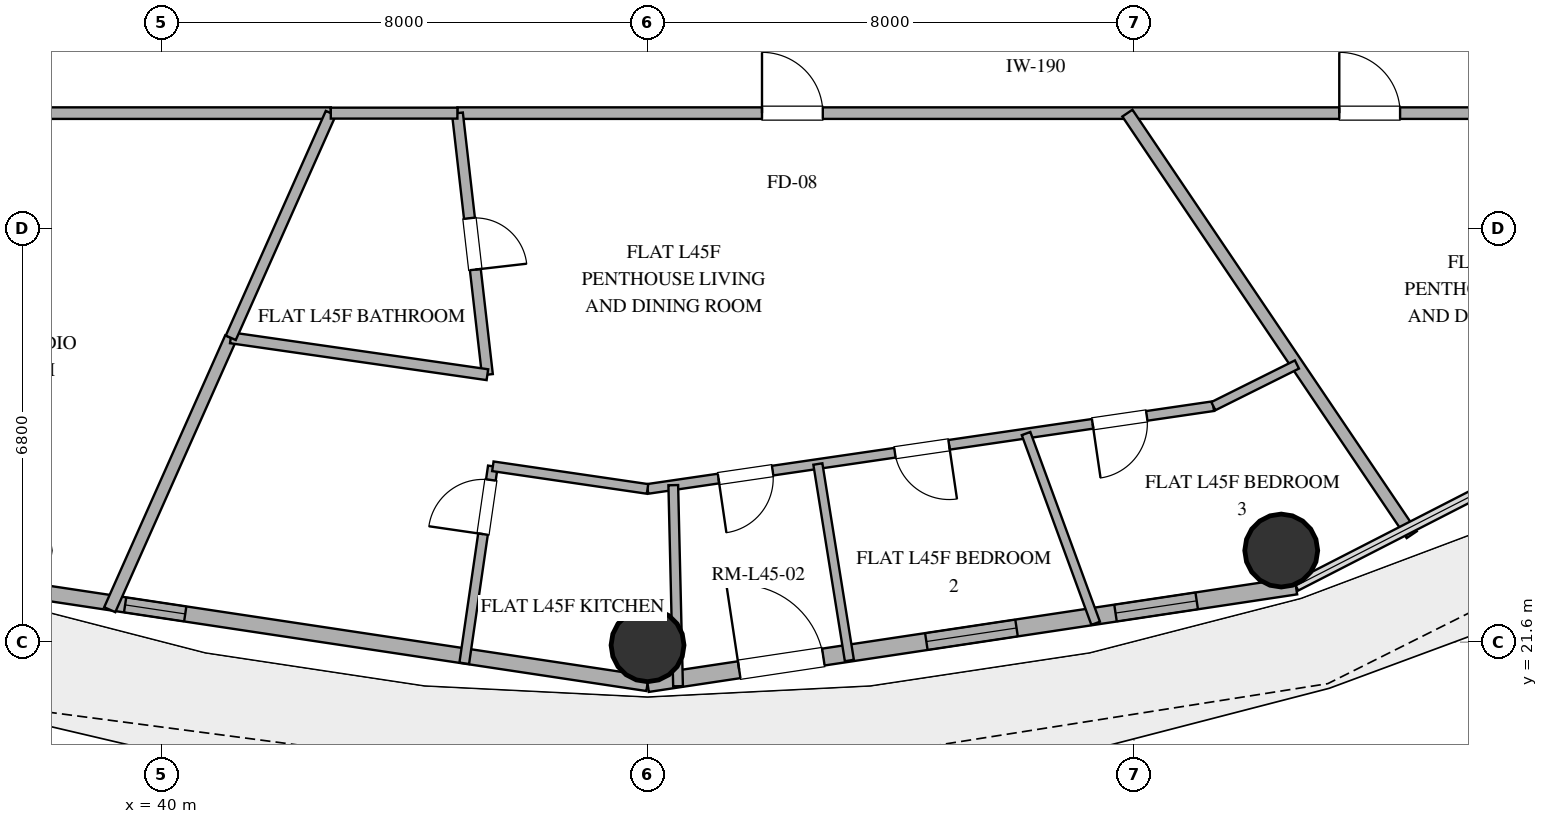
"""IFC4 building model, lengths in metres.
Left out: names, types, materials, properties, quantities, classifications, styles, units other than length and angle.
Written with IfcOpenShell. Run it as: python <this file> out.ifc"""

import sys

from ifc_helpers import new_model, si_unit, direction, frame, frame_2d, origin, origin_2d, place, context, subcontext, project, spatial, rectangle, hollow_circle, extrude, element, fill, save


model = new_model("IFC4")
c1 = context("Model", 3, precision=1e-05, world=origin(), true_north=direction((0.0, 1.0)))
c2 = subcontext(c1, "Body", "Model", "MODEL_VIEW")
j1 = project(units=[si_unit("LENGTHUNIT", "METRE"), si_unit("PLANEANGLEUNIT", "RADIAN")], contexts=[c1])
p1 = place(None, origin())
s1 = spatial("IfcSite", under=j1, at=p1, CompositionType="ELEMENT")
p2 = place(p1, origin())
s2 = spatial("IfcBuilding", under=s1, at=p2, CompositionType="ELEMENT")
p3 = place(p2, frame((0.0, 0.0, 179.4)))
s3 = spatial("IfcBuildingStorey", under=s2, at=p3, CompositionType="ELEMENT", Elevation=179.4)
for number, where, z_axis, x_axis in (
    (1, (48.0, 21.55, 0.0), (0.0, 0.0, 1.0), (1.0, 0.0, 0.0)),
    (2, (58.422, 23.107, 0.0), (0.0, 0.0, 1.0), (1.0, 0.0, 0.0)),
):
    element("IfcColumn", number, at=place(p3, frame(where, z_axis=z_axis, x_axis=x_axis)), inside=s3, PredefinedType="COLUMN", context=c2, shape_type="SweptSolid", body=[
        extrude(hollow_circle(Radius=0.6, WallThickness=0.032, at=origin_2d()), origin(), (0.0, 0.0, 1.0), 3.38),
    ])
p4 = place(p3, frame((37.337, 22.525, 0.0), z_axis=(0.0, 0.0, 1.0), x_axis=(0.988863993413, -0.148822049884, 0.0)))
e3 = element("IfcWall", 3, at=p4, inside=s3, PredefinedType="SOLIDWALL", context=c2, shape_type="SweptSolid", body=[
    extrude(rectangle(XDim=10.783, YDim=0.25, at=frame_2d((5.392, 0.0))), origin(), (0.0, 0.0, 1.0), 3.38),
])
p5 = place(p4, frame((2.094, 0.0, 0.35)))
e4 = element("IfcOpeningElement", 4, at=p5, cuts=e3, PredefinedType="OPENING", context=c2, shape_type="SweptSolid", body=[
    extrude(rectangle(XDim=1.0, YDim=1.05, at=frame_2d((0.5, 0.525))), frame((0.0, 0.135, 0.0), z_axis=(0.0, -1.0, 0.0), x_axis=(1.0, 0.0, 0.0)), (0.0, 0.0, 1.0), 0.27),
])
p6 = place(p3, frame((48.0, 20.92, 0.0), z_axis=(0.0, 0.0, 1.0), x_axis=(0.988863993413, 0.148822049884, 0.0)))
e5 = element("IfcWall", 5, at=p6, inside=s3, PredefinedType="SOLIDWALL", context=c2, shape_type="SweptSolid", body=[
    extrude(rectangle(XDim=10.783, YDim=0.28, at=frame_2d((5.392, 0.0))), origin(), (0.0, 0.0, 1.0), 3.38),
])
p7 = place(p6, frame((1.524, 0.0, 0.0)))
e6 = element("IfcOpeningElement", 6, at=p7, cuts=e5, PredefinedType="OPENING", context=c2, shape_type="SweptSolid", body=[
    extrude(rectangle(XDim=1.4, YDim=2.2, at=frame_2d((0.7, 1.1))), frame((0.0, 0.15, 0.0), z_axis=(0.0, -1.0, 0.0), x_axis=(1.0, 0.0, 0.0)), (0.0, 0.0, 1.0), 0.3),
])
p8 = place(p6, frame((4.637, 0.0, 0.85)))
e7 = element("IfcOpeningElement", 7, at=p8, cuts=e5, PredefinedType="OPENING", context=c2, shape_type="SweptSolid", body=[
    extrude(rectangle(XDim=1.5, YDim=2.0, at=frame_2d((0.75, 1.0))), frame((0.0, 0.15, 0.0), z_axis=(0.0, -1.0, 0.0), x_axis=(1.0, 0.0, 0.0)), (0.0, 0.0, 1.0), 0.3),
])
p9 = place(p6, frame((7.783, 0.0, 0.85)))
e8 = element("IfcOpeningElement", 8, at=p9, cuts=e5, PredefinedType="OPENING", context=c2, shape_type="SweptSolid", body=[
    extrude(rectangle(XDim=1.35, YDim=1.8, at=frame_2d((0.675, 0.9))), frame((0.0, 0.15, 0.0), z_axis=(0.0, -1.0, 0.0), x_axis=(1.0, 0.0, 0.0)), (0.0, 0.0, 1.0), 0.3),
])
p10 = place(p3, frame((44.873, 30.3, 0.0), z_axis=(0.0, 0.0, 1.0), x_axis=(1.0, 0.0, 0.0)))
e9 = element("IfcWall", 9, at=p10, inside=s3, PredefinedType="PARTITIONING", context=c2, shape_type="SweptSolid", body=[
    extrude(rectangle(XDim=19.027, YDim=0.19, at=frame_2d((9.514, 0.0))), origin(), (0.0, 0.0, 1.0), 2.74),
])
p11 = place(p10, frame((5.01, 0.0, 0.0)))
e10 = element("IfcOpeningElement", 10, at=p11, cuts=e9, PredefinedType="OPENING", context=c2, shape_type="SweptSolid", body=[
    extrude(rectangle(XDim=1.0, YDim=2.2, at=frame_2d((0.5, 1.1))), frame((0.0, 0.105, 0.0), z_axis=(0.0, -1.0, 0.0), x_axis=(1.0, 0.0, 0.0)), (0.0, 0.0, 1.0), 0.21),
])
p12 = place(p10, frame((14.504, 0.0, 0.0)))
e11 = element("IfcOpeningElement", 11, at=p12, cuts=e9, PredefinedType="OPENING", context=c2, shape_type="SweptSolid", body=[
    extrude(rectangle(XDim=1.0, YDim=2.2, at=frame_2d((0.5, 1.1))), frame((0.0, 0.105, 0.0), z_axis=(0.0, -1.0, 0.0), x_axis=(1.0, 0.0, 0.0)), (0.0, 0.0, 1.0), 0.21),
])
p13 = place(p3, frame((32.1, 30.3, 0.0), z_axis=(0.0, 0.0, 1.0), x_axis=(1.0, 0.0, 0.0)))
e12 = element("IfcWall", 12, at=p13, inside=s3, PredefinedType="PARTITIONING", context=c2, shape_type="SweptSolid", body=[
    extrude(rectangle(XDim=10.691, YDim=0.19, at=frame_2d((5.345, 0.0))), origin(), (0.0, 0.0, 1.0), 2.74),
])
p14 = place(p13, frame((4.845, 0.0, 0.0)))
e13 = element("IfcOpeningElement", 13, at=p14, cuts=e12, PredefinedType="OPENING", context=c2, shape_type="SweptSolid", body=[
    extrude(rectangle(XDim=1.0, YDim=2.2, at=frame_2d((0.5, 1.1))), frame((0.0, 0.105, 0.0), z_axis=(0.0, -1.0, 0.0), x_axis=(1.0, 0.0, 0.0)), (0.0, 0.0, 1.0), 0.21),
])
p15 = place(p3, frame((55.892, 30.3, 0.0), z_axis=(0.0, 0.0, 1.0), x_axis=(0.55918600376, -0.829042226427, 0.0)))
e14 = element("IfcWall", 14, at=p15, inside=s3, PredefinedType="PARTITIONING", context=c2, shape_type="SweptSolid", body=[
    extrude(rectangle(XDim=8.362, YDim=0.2, at=frame_2d((4.181, 0.0))), origin(), (0.0, 0.0, 1.0), 2.74),
])
p16 = place(p3, frame((39.155, 22.134, 0.0), z_axis=(0.0, 0.0, 1.0), x_axis=(0.406740050792, 0.913543940422, 0.0)))
e15 = element("IfcWall", 15, at=p16, inside=s3, PredefinedType="PARTITIONING", context=c2, shape_type="SweptSolid", body=[
    extrude(rectangle(XDim=4.894, YDim=0.2, at=frame_2d((2.447, 0.0))), origin(), (0.0, 0.0, 1.0), 2.74),
])
p17 = place(p3, frame((44.873, 30.3, 0.0), z_axis=(0.0, 0.0, 1.0), x_axis=(0.11390281129, -0.993491897088, 0.0)))
e16 = element("IfcWall", 16, at=p17, inside=s3, PredefinedType="PLUMBINGWALL", context=c2, shape_type="SweptSolid", body=[
    extrude(rectangle(XDim=4.33, YDim=0.18, at=frame_2d((2.165, 0.0))), origin(), (0.0, 0.0, 1.0), 2.74),
])
p18 = place(p17, frame((1.74, 0.0, 0.0)))
e17 = element("IfcOpeningElement", 17, at=p18, cuts=e16, PredefinedType="OPENING", context=c2, shape_type="SweptSolid", body=[
    extrude(rectangle(XDim=0.85, YDim=2.1, at=frame_2d((0.425, 1.05))), frame((0.0, 0.1, 0.0), z_axis=(0.0, -1.0, 0.0), x_axis=(1.0, 0.0, 0.0)), (0.0, 0.0, 1.0), 0.2),
])
p19 = place(p3, frame((45.366, 25.999, 0.0), z_axis=(0.0, 0.0, 1.0), x_axis=(-0.98982427769, 0.14229511339, 0.0)))
e18 = element("IfcWall", 18, at=p19, inside=s3, PredefinedType="PLUMBINGWALL", context=c2, shape_type="SweptSolid", body=[
    extrude(rectangle(XDim=4.264, YDim=0.18, at=frame_2d((2.132, 0.0))), origin(), (0.0, 0.0, 1.0), 2.74),
])
p20 = place(p3, frame((41.146, 26.605, 0.0), z_axis=(0.0, 0.0, 1.0), x_axis=(0.406732062562, 0.913547497005, 0.0)))
e19 = element("IfcWall", 19, at=p20, inside=s3, PredefinedType="PLUMBINGWALL", context=c2, shape_type="SweptSolid", body=[
    extrude(rectangle(XDim=4.044, YDim=0.18, at=frame_2d((2.022, 0.0))), origin(), (0.0, 0.0, 1.0), 2.74),
])
p21 = place(p3, frame((57.305, 25.481, 0.0), z_axis=(0.0, 0.0, 1.0), x_axis=(-0.989470950226, -0.144731609055, 0.0)))
e20 = element("IfcWall", 20, at=p21, inside=s3, PredefinedType="PLUMBINGWALL", context=c2, shape_type="SweptSolid", body=[
    extrude(rectangle(XDim=9.404, YDim=0.16, at=frame_2d((4.702, 0.0))), origin(), (0.0, 0.0, 1.0), 2.74),
])
p22 = place(p21, frame((4.393, 0.0, 0.0)))
e21 = element("IfcOpeningElement", 21, at=p22, cuts=e20, PredefinedType="OPENING", context=c2, shape_type="SweptSolid", body=[
    extrude(rectangle(XDim=0.9, YDim=2.1, at=frame_2d((0.45, 1.05))), frame((0.0, 0.09, 0.0), z_axis=(0.0, -1.0, 0.0), x_axis=(1.0, 0.0, 0.0)), (0.0, 0.0, 1.0), 0.18),
])
p23 = place(p21, frame((1.106, 0.0, 0.0)))
e22 = element("IfcOpeningElement", 22, at=p23, cuts=e20, PredefinedType="OPENING", context=c2, shape_type="SweptSolid", body=[
    extrude(rectangle(XDim=0.9, YDim=2.1, at=frame_2d((0.45, 1.05))), frame((0.0, 0.09, 0.0), z_axis=(0.0, -1.0, 0.0), x_axis=(1.0, 0.0, 0.0)), (0.0, 0.0, 1.0), 0.18),
])
p24 = place(p21, frame((7.325, 0.0, 0.0)))
e23 = element("IfcOpeningElement", 23, at=p24, cuts=e20, PredefinedType="OPENING", context=c2, shape_type="SweptSolid", body=[
    extrude(rectangle(XDim=0.9, YDim=2.1, at=frame_2d((0.45, 1.05))), frame((0.0, 0.09, 0.0), z_axis=(0.0, -1.0, 0.0), x_axis=(1.0, 0.0, 0.0)), (0.0, 0.0, 1.0), 0.18),
])
p25 = place(p3, frame((55.37, 21.91, 0.0), z_axis=(0.0, 0.0, 1.0), x_axis=(-0.344425148523, 0.938813781889, 0.0)))
e24 = element("IfcWall", 24, at=p25, inside=s3, PredefinedType="PARTITIONING", context=c2, shape_type="SweptSolid", body=[
    extrude(rectangle(XDim=3.324, YDim=0.15, at=frame_2d((1.662, 0.0))), origin(), (0.0, 0.0, 1.0), 2.74),
])
p26 = place(p3, frame((48.423, 24.182, 0.0), z_axis=(0.0, 0.0, 1.0), x_axis=(0.023765895275, -0.999717551222, 0.0)))
e25 = element("IfcWall", 25, at=p26, inside=s3, PredefinedType="PLUMBINGWALL", context=c2, shape_type="SweptSolid", body=[
    extrude(rectangle(XDim=3.308, YDim=0.16, at=frame_2d((1.654, 0.0))), origin(), (0.0, 0.0, 1.0), 2.74),
])
p27 = place(p3, frame((44.985, 21.252, 0.0), z_axis=(0.0, 0.0, 1.0), x_axis=(0.14376989574, 0.989611144379, 0.0)))
e26 = element("IfcWall", 26, at=p27, inside=s3, PredefinedType="PLUMBINGWALL", context=c2, shape_type="SweptSolid", body=[
    extrude(rectangle(XDim=3.274, YDim=0.16, at=frame_2d((1.637, 0.0))), origin(), (0.0, 0.0, 1.0), 2.74),
])
p28 = place(p27, frame((2.147, 0.0, 0.0)))
e27 = element("IfcOpeningElement", 27, at=p28, cuts=e26, PredefinedType="OPENING", context=c2, shape_type="SweptSolid", body=[
    extrude(rectangle(XDim=0.9, YDim=2.1, at=frame_2d((0.45, 1.05))), frame((0.0, 0.09, 0.0), z_axis=(0.0, -1.0, 0.0), x_axis=(1.0, 0.0, 0.0)), (0.0, 0.0, 1.0), 0.18),
])
p29 = place(p3, frame((51.319, 21.298, 0.0), z_axis=(0.0, 0.0, 1.0), x_axis=(-0.158287238469, 0.987393108209, 0.0)))
e28 = element("IfcWall", 28, at=p29, inside=s3, PredefinedType="PARTITIONING", context=c2, shape_type="SweptSolid", body=[
    extrude(rectangle(XDim=3.273, YDim=0.15, at=frame_2d((1.636, 0.0))), origin(), (0.0, 0.0, 1.0), 2.74),
])
p30 = place(p3, frame((45.456, 24.492, 0.0), z_axis=(0.0, 0.0, 1.0), x_axis=(0.989473006689, -0.144717549155, 0.0)))
e29 = element("IfcWall", 29, at=p30, inside=s3, PredefinedType="PLUMBINGWALL", context=c2, shape_type="SweptSolid", body=[
    extrude(rectangle(XDim=2.571, YDim=0.16, at=frame_2d((1.286, 0.0))), origin(), (0.0, 0.0, 1.0), 2.74),
])
p31 = place(p3, frame((42.791, 30.3, 0.0), z_axis=(0.0, 0.0, 1.0), x_axis=(1.0, 0.0, 0.0)))
e30 = element("IfcWall", 30, at=p31, inside=s3, PredefinedType="PLUMBINGWALL", context=c2, shape_type="SweptSolid", body=[
    extrude(rectangle(XDim=2.082, YDim=0.18, at=frame_2d((1.041, 0.0))), origin(), (0.0, 0.0, 1.0), 2.74),
])
p32 = place(p3, frame((57.305, 25.481, 0.0), z_axis=(0.0, 0.0, 1.0), x_axis=(0.89499854631, 0.446069055308, 0.0)))
e31 = element("IfcWall", 31, at=p32, inside=s3, PredefinedType="PARTITIONING", context=c2, shape_type="SweptSolid", body=[
    extrude(rectangle(XDim=1.536, YDim=0.15, at=frame_2d((0.768, 0.0))), origin(), (0.0, 0.0, 1.0), 2.74),
])
p33 = place(p7, origin())
e32 = element("IfcDoor", 32, at=p33, inside=s3, OperationType="SINGLE_SWING_LEFT", PredefinedType="DOOR", context=c2, shape_type="SweptSolid", body=[
    extrude(rectangle(XDim=1.4, YDim=2.2, at=frame_2d((0.7, 1.1))), frame((0.0, 0.025, 0.0), z_axis=(0.0, -1.0, 0.0), x_axis=(1.0, 0.0, 0.0)), (0.0, 0.0, 1.0), 0.05),
])
fill(e6, e32)
p34 = place(p8, origin())
e33 = element("IfcWindow", 33, at=p34, inside=s3, PartitioningType="SINGLE_PANEL", PredefinedType="WINDOW", context=c2, shape_type="SweptSolid", body=[
    extrude(rectangle(XDim=1.5, YDim=2.0, at=frame_2d((0.75, 1.0))), frame((0.0, 0.03, 0.0), z_axis=(0.0, -1.0, 0.0), x_axis=(1.0, 0.0, 0.0)), (0.0, 0.0, 1.0), 0.06),
])
fill(e7, e33)
p35 = place(p9, origin())
e34 = element("IfcWindow", 34, at=p35, inside=s3, PartitioningType="SINGLE_PANEL", PredefinedType="WINDOW", context=c2, shape_type="SweptSolid", body=[
    extrude(rectangle(XDim=1.35, YDim=1.8, at=frame_2d((0.675, 0.9))), frame((0.0, 0.03, 0.0), z_axis=(0.0, -1.0, 0.0), x_axis=(1.0, 0.0, 0.0)), (0.0, 0.0, 1.0), 0.06),
])
fill(e8, e34)
p36 = place(p5, origin())
e35 = element("IfcWindow", 35, at=p36, inside=s3, PartitioningType="SINGLE_PANEL", PredefinedType="WINDOW", context=c2, shape_type="SweptSolid", body=[
    extrude(rectangle(XDim=1.0, YDim=1.05, at=frame_2d((0.5, 0.525))), frame((0.0, 0.03, 0.0), z_axis=(0.0, -1.0, 0.0), x_axis=(1.0, 0.0, 0.0)), (0.0, 0.0, 1.0), 0.06),
])
fill(e4, e35)
p37 = place(p11, origin())
e36 = element("IfcDoor", 36, at=p37, inside=s3, OperationType="SINGLE_SWING_LEFT", PredefinedType="DOOR", context=c2, shape_type="SweptSolid", body=[
    extrude(rectangle(XDim=1.0, YDim=2.2, at=frame_2d((0.5, 1.1))), frame((0.0, 0.025, 0.0), z_axis=(0.0, -1.0, 0.0), x_axis=(1.0, 0.0, 0.0)), (0.0, 0.0, 1.0), 0.05),
])
fill(e10, e36)
p38 = place(p12, origin())
e37 = element("IfcDoor", 37, at=p38, inside=s3, OperationType="SINGLE_SWING_LEFT", PredefinedType="DOOR", context=c2, shape_type="SweptSolid", body=[
    extrude(rectangle(XDim=1.0, YDim=2.2, at=frame_2d((0.5, 1.1))), frame((0.0, 0.025, 0.0), z_axis=(0.0, -1.0, 0.0), x_axis=(1.0, 0.0, 0.0)), (0.0, 0.0, 1.0), 0.05),
])
fill(e11, e37)
p39 = place(p18, origin())
e38 = element("IfcDoor", 38, at=p39, inside=s3, OperationType="SINGLE_SWING_RIGHT", PredefinedType="DOOR", context=c2, shape_type="SweptSolid", body=[
    extrude(rectangle(XDim=0.85, YDim=2.1, at=frame_2d((0.425, 1.05))), frame((0.0, 0.025, 0.0), z_axis=(0.0, -1.0, 0.0), x_axis=(1.0, 0.0, 0.0)), (0.0, 0.0, 1.0), 0.05),
])
fill(e17, e38)
p40 = place(p22, origin())
e39 = element("IfcDoor", 39, at=p40, inside=s3, OperationType="SINGLE_SWING_LEFT", PredefinedType="DOOR", context=c2, shape_type="SweptSolid", body=[
    extrude(rectangle(XDim=0.9, YDim=2.1, at=frame_2d((0.45, 1.05))), frame((0.0, 0.025, 0.0), z_axis=(0.0, -1.0, 0.0), x_axis=(1.0, 0.0, 0.0)), (0.0, 0.0, 1.0), 0.05),
])
fill(e21, e39)
p41 = place(p23, origin())
e40 = element("IfcDoor", 40, at=p41, inside=s3, OperationType="SINGLE_SWING_RIGHT", PredefinedType="DOOR", context=c2, shape_type="SweptSolid", body=[
    extrude(rectangle(XDim=0.9, YDim=2.1, at=frame_2d((0.45, 1.05))), frame((0.0, 0.025, 0.0), z_axis=(0.0, -1.0, 0.0), x_axis=(1.0, 0.0, 0.0)), (0.0, 0.0, 1.0), 0.05),
])
fill(e22, e40)
p42 = place(p24, origin())
e41 = element("IfcDoor", 41, at=p42, inside=s3, OperationType="SINGLE_SWING_RIGHT", PredefinedType="DOOR", context=c2, shape_type="SweptSolid", body=[
    extrude(rectangle(XDim=0.9, YDim=2.1, at=frame_2d((0.45, 1.05))), frame((0.0, 0.025, 0.0), z_axis=(0.0, -1.0, 0.0), x_axis=(1.0, 0.0, 0.0)), (0.0, 0.0, 1.0), 0.05),
])
fill(e23, e41)
p43 = place(p28, origin())
e42 = element("IfcDoor", 42, at=p43, inside=s3, OperationType="SINGLE_SWING_LEFT", PredefinedType="DOOR", context=c2, shape_type="SweptSolid", body=[
    extrude(rectangle(XDim=0.9, YDim=2.1, at=frame_2d((0.45, 1.05))), frame((0.0, 0.025, 0.0), z_axis=(0.0, -1.0, 0.0), x_axis=(1.0, 0.0, 0.0)), (0.0, 0.0, 1.0), 0.05),
])
fill(e27, e42)
save(model, sys.argv[1])
